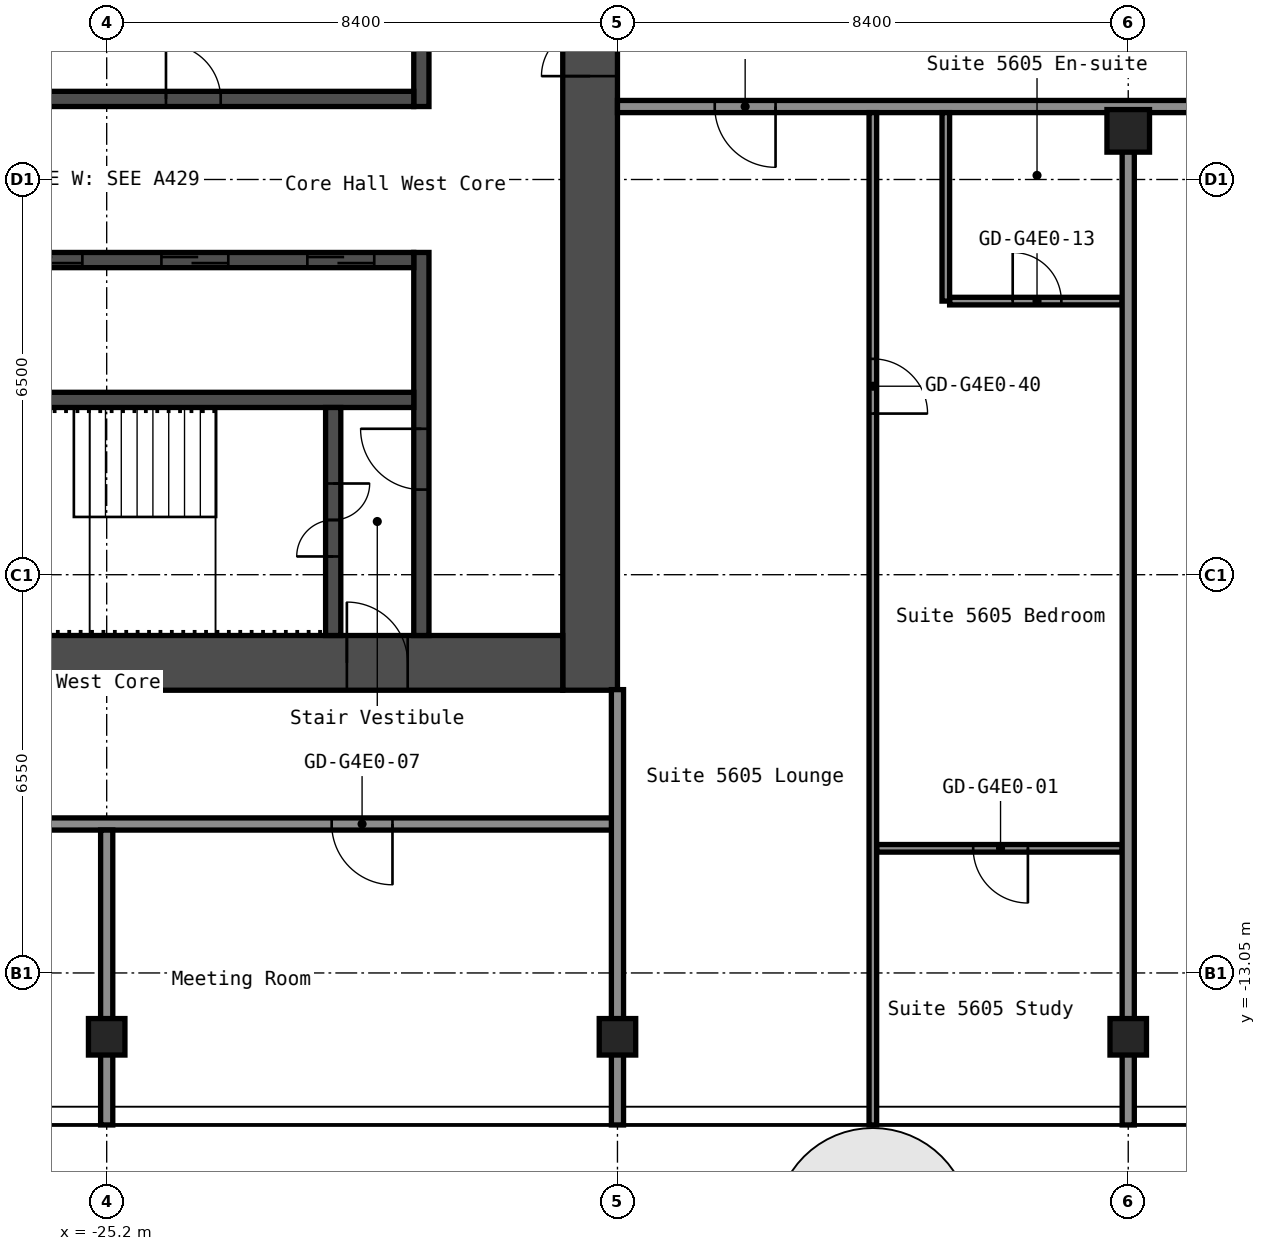
"""IFC4 building model, lengths in metres.
Left out: names, types, materials, properties, quantities, classifications, styles, units other than length and angle.
Written with IfcOpenShell. Run it as: python <this file> out.ifc"""

import sys

from ifc_helpers import new_model, si_unit, direction, frame, frame_2d, origin, origin_2d, place, context, subcontext, project, spatial, rectangle, hollow_rectangle, extrude, element, fill, save


model = new_model("IFC4")
c1 = context("Model", 3, precision=1e-05, world=origin(), true_north=direction((0.0, 1.0)))
c2 = subcontext(c1, "Body", "Model", "MODEL_VIEW")
j1 = project(units=[si_unit("LENGTHUNIT", "METRE"), si_unit("PLANEANGLEUNIT", "RADIAN")], contexts=[c1])
p1 = place(None, origin())
s1 = spatial("IfcSite", under=j1, at=p1, CompositionType="ELEMENT")
p2 = place(p1, origin())
s2 = spatial("IfcBuilding", under=s1, at=p2, CompositionType="ELEMENT")
p3 = place(p2, frame((0.0, 0.0, 199.4)))
s3 = spatial("IfcBuildingStorey", under=s2, at=p3, CompositionType="ELEMENT", Elevation=199.4)
for number, where, z_axis, x_axis in (
    (1, (-25.2, -14.1, 0.0), (0.0, 0.0, 1.0), (1.0, 0.0, 0.0)),
    (2, (-16.8, -14.1, 0.0), (0.0, 0.0, 1.0), (1.0, 0.0, 0.0)),
    (3, (-8.4, -14.1, 0.0), (0.0, 0.0, 1.0), (1.0, 0.0, 0.0)),
):
    element("IfcColumn", number, at=place(p3, frame(where, z_axis=z_axis, x_axis=x_axis)), inside=s3, PredefinedType="COLUMN", context=c2, shape_type="SweptSolid", body=[
        extrude(hollow_rectangle(XDim=0.6, YDim=0.6, WallThickness=0.025, InnerFilletRadius=0.038, OuterFilletRadius=0.062, at=origin_2d()), origin(), (0.0, 0.0, 1.0), 2.75),
    ])
p4 = place(p3, frame((-8.4, 0.8, 0.0), z_axis=(0.0, 0.0, 1.0), x_axis=(1.0, 0.0, 0.0)))
e4 = element("IfcColumn", 4, at=p4, inside=s3, PredefinedType="COLUMN", context=c2, shape_type="SweptSolid", body=[
    extrude(hollow_rectangle(XDim=0.7, YDim=0.7, WallThickness=0.028, at=origin_2d()), origin(), (0.0, 0.0, 1.0), 2.75),
])
p5 = place(p3, frame((-17.25, -8.4, 0.0), z_axis=(0.0, 0.0, 1.0), x_axis=(0.0, 1.0, 0.0)))
e5 = element("IfcWall", 5, at=p5, inside=s3, PredefinedType="SHEAR", context=c2, shape_type="SweptSolid", body=[
    extrude(rectangle(XDim=16.8, YDim=0.9, at=frame_2d((8.4, 0.0))), origin(), (0.0, 0.0, 1.0), 2.75),
])
p6 = place(p5, frame((10.1, 0.0, 0.0)))
e6 = element("IfcOpeningElement", 6, at=p6, cuts=e5, PredefinedType="OPENING", context=c2, shape_type="SweptSolid", body=[
    extrude(rectangle(XDim=1.6, YDim=2.1, at=frame_2d((0.8, 1.05))), frame((0.0, 0.46, 0.0), z_axis=(0.0, -1.0, 0.0), x_axis=(1.0, 0.0, 0.0)), (0.0, 0.0, 1.0), 0.92),
])
p7 = place(p3, frame((-32.7, -7.95, 0.0), z_axis=(0.0, 0.0, 1.0), x_axis=(1.0, 0.0, 0.0)))
e7 = element("IfcWall", 7, at=p7, inside=s3, PredefinedType="SHEAR", context=c2, shape_type="SweptSolid", body=[
    extrude(rectangle(XDim=15.0, YDim=0.9, at=frame_2d((7.5, 0.0))), origin(), (0.0, 0.0, 1.0), 2.75),
])
p8 = place(p7, frame((11.45, 0.0, 0.0)))
e8 = element("IfcOpeningElement", 8, at=p8, cuts=e7, PredefinedType="OPENING", context=c2, shape_type="SweptSolid", body=[
    extrude(rectangle(XDim=1.0, YDim=2.1, at=frame_2d((0.5, 1.05))), frame((0.0, 0.46, 0.0), z_axis=(0.0, -1.0, 0.0), x_axis=(1.0, 0.0, 0.0)), (0.0, 0.0, 1.0), 0.92),
])
p9 = place(p3, frame((-20.025, 1.2, 0.0), z_axis=(0.0, 0.0, 1.0), x_axis=(0.0, 1.0, 0.0)))
e9 = element("IfcWall", 9, at=p9, inside=s3, PredefinedType="SHEAR", context=c2, shape_type="SweptSolid", body=[
    extrude(rectangle(XDim=6.3, YDim=0.25, at=frame_2d((3.15, 0.0))), origin(), (0.0, 0.0, 1.0), 2.75),
])
p10 = place(p3, frame((-20.025, -7.5, 0.0), z_axis=(0.0, 0.0, 1.0), x_axis=(0.0, 1.0, 0.0)))
e10 = element("IfcWall", 10, at=p10, inside=s3, PredefinedType="SHEAR", context=c2, shape_type="SweptSolid", body=[
    extrude(rectangle(XDim=6.3, YDim=0.25, at=frame_2d((3.15, 0.0))), origin(), (0.0, 0.0, 1.0), 2.75),
])
p11 = place(p10, frame((2.4, 0.0, 0.0)))
e11 = element("IfcOpeningElement", 11, at=p11, cuts=e10, PredefinedType="OPENING", context=c2, shape_type="SweptSolid", body=[
    extrude(rectangle(XDim=1.0, YDim=2.1, at=frame_2d((0.5, 1.05))), frame((0.0, 0.135, 0.0), z_axis=(0.0, -1.0, 0.0), x_axis=(1.0, 0.0, 0.0)), (0.0, 0.0, 1.0), 0.27),
])
p12 = place(p3, frame((-27.65, 1.325, 0.0), z_axis=(0.0, 0.0, 1.0), x_axis=(1.0, 0.0, 0.0)))
e12 = element("IfcWall", 12, at=p12, inside=s3, PredefinedType="SHEAR", context=c2, shape_type="SweptSolid", body=[
    extrude(rectangle(XDim=7.5, YDim=0.25, at=frame_2d((3.75, 0.0))), origin(), (0.0, 0.0, 1.0), 2.75),
])
p13 = place(p12, frame((3.425, 0.0, 0.0)))
e13 = element("IfcOpeningElement", 13, at=p13, cuts=e12, PredefinedType="OPENING", context=c2, shape_type="SweptSolid", body=[
    extrude(rectangle(XDim=0.9, YDim=2.1, at=frame_2d((0.45, 1.05))), frame((0.0, 0.135, 0.0), z_axis=(0.0, -1.0, 0.0), x_axis=(1.0, 0.0, 0.0)), (0.0, 0.0, 1.0), 0.27),
])
p14 = place(p3, frame((-27.65, -1.325, 0.0), z_axis=(0.0, 0.0, 1.0), x_axis=(1.0, 0.0, 0.0)))
e14 = element("IfcWall", 14, at=p14, inside=s3, PredefinedType="SHEAR", context=c2, shape_type="SweptSolid", body=[
    extrude(rectangle(XDim=7.5, YDim=0.25, at=frame_2d((3.75, 0.0))), origin(), (0.0, 0.0, 1.0), 2.75),
])
p15 = place(p14, frame((5.75, 0.0, 0.0)))
e15 = element("IfcOpeningElement", 15, at=p15, cuts=e14, PredefinedType="OPENING", context=c2, shape_type="SweptSolid", body=[
    extrude(rectangle(XDim=1.1, YDim=2.1, at=frame_2d((0.55, 1.05))), frame((0.0, 0.135, 0.0), z_axis=(0.0, -1.0, 0.0), x_axis=(1.0, 0.0, 0.0)), (0.0, 0.0, 1.0), 0.27),
])
p16 = place(p14, frame((3.35, 0.0, 0.0)))
e16 = element("IfcOpeningElement", 16, at=p16, cuts=e14, PredefinedType="OPENING", context=c2, shape_type="SweptSolid", body=[
    extrude(rectangle(XDim=1.1, YDim=2.1, at=frame_2d((0.55, 1.05))), frame((0.0, 0.135, 0.0), z_axis=(0.0, -1.0, 0.0), x_axis=(1.0, 0.0, 0.0)), (0.0, 0.0, 1.0), 0.27),
])
p17 = place(p14, frame((0.95, 0.0, 0.0)))
e17 = element("IfcOpeningElement", 17, at=p17, cuts=e14, PredefinedType="OPENING", context=c2, shape_type="SweptSolid", body=[
    extrude(rectangle(XDim=1.1, YDim=2.1, at=frame_2d((0.55, 1.05))), frame((0.0, 0.135, 0.0), z_axis=(0.0, -1.0, 0.0), x_axis=(1.0, 0.0, 0.0)), (0.0, 0.0, 1.0), 0.27),
])
p18 = place(p3, frame((-27.65, -3.625, 0.0), z_axis=(0.0, 0.0, 1.0), x_axis=(1.0, 0.0, 0.0)))
e18 = element("IfcWall", 18, at=p18, inside=s3, PredefinedType="SHEAR", context=c2, shape_type="SweptSolid", body=[
    extrude(rectangle(XDim=7.5, YDim=0.25, at=frame_2d((3.75, 0.0))), origin(), (0.0, 0.0, 1.0), 2.75),
])
p19 = place(p3, frame((-21.475, -7.5, 0.0), z_axis=(0.0, 0.0, 1.0), x_axis=(0.0, 1.0, 0.0)))
e19 = element("IfcWall", 19, at=p19, inside=s3, PredefinedType="SHEAR", context=c2, shape_type="SweptSolid", body=[
    extrude(rectangle(XDim=3.75, YDim=0.25, at=frame_2d((1.875, 0.0))), origin(), (0.0, 0.0, 1.0), 2.75),
])
p20 = place(p19, frame((1.3, 0.0, 0.0)))
e20 = element("IfcOpeningElement", 20, at=p20, cuts=e19, PredefinedType="OPENING", context=c2, shape_type="SweptSolid", body=[
    extrude(rectangle(XDim=1.2, YDim=2.1, at=frame_2d((0.6, 1.05))), frame((0.0, 0.135, 0.0), z_axis=(0.0, -1.0, 0.0), x_axis=(1.0, 0.0, 0.0)), (0.0, 0.0, 1.0), 0.27),
])
p21 = place(p3, frame((-12.538, -11.0, 0.0), z_axis=(0.0, 0.0, 1.0), x_axis=(1.0, 0.0, 0.0)))
e21 = element("IfcWall", 21, at=p21, inside=s3, PredefinedType="PARTITIONING", context=c2, shape_type="SweptSolid", body=[
    extrude(rectangle(XDim=4.038, YDim=0.125, at=frame_2d((2.019, 0.0))), origin(), (0.0, 0.0, 1.0), 2.75),
])
p22 = place(p21, frame((1.587, 0.0, 0.0)))
e22 = element("IfcOpeningElement", 22, at=p22, cuts=e21, PredefinedType="OPENING", context=c2, shape_type="SweptSolid", body=[
    extrude(rectangle(XDim=0.9, YDim=2.1, at=frame_2d((0.45, 1.05))), frame((0.0, 0.073, 0.0), z_axis=(0.0, -1.0, 0.0), x_axis=(1.0, 0.0, 0.0)), (0.0, 0.0, 1.0), 0.145),
])
p23 = place(p3, frame((-38.1, -10.6, 0.0), z_axis=(0.0, 0.0, 1.0), x_axis=(1.0, 0.0, 0.0)))
e23 = element("IfcWall", 23, at=p23, inside=s3, PredefinedType="PARTITIONING", context=c2, shape_type="SweptSolid", body=[
    extrude(rectangle(XDim=21.3, YDim=0.2, at=frame_2d((10.65, 0.0))), origin(), (0.0, 0.0, 1.0), 2.75),
])
p24 = place(p23, frame((1.95, 0.0, 0.0)))
e24 = element("IfcOpeningElement", 24, at=p24, cuts=e23, PredefinedType="OPENING", context=c2, shape_type="SweptSolid", body=[
    extrude(rectangle(XDim=0.9, YDim=2.1, at=frame_2d((0.45, 1.05))), frame((0.0, 0.11, 0.0), z_axis=(0.0, -1.0, 0.0), x_axis=(1.0, 0.0, 0.0)), (0.0, 0.0, 1.0), 0.22),
])
p25 = place(p23, frame((6.32, 0.0, 0.0)))
e25 = element("IfcOpeningElement", 25, at=p25, cuts=e23, PredefinedType="OPENING", context=c2, shape_type="SweptSolid", body=[
    extrude(rectangle(XDim=0.9, YDim=2.1, at=frame_2d((0.45, 1.05))), frame((0.0, 0.11, 0.0), z_axis=(0.0, -1.0, 0.0), x_axis=(1.0, 0.0, 0.0)), (0.0, 0.0, 1.0), 0.22),
])
p26 = place(p23, frame((10.52, 0.0, 0.0)))
e26 = element("IfcOpeningElement", 26, at=p26, cuts=e23, PredefinedType="OPENING", context=c2, shape_type="SweptSolid", body=[
    extrude(rectangle(XDim=0.9, YDim=2.1, at=frame_2d((0.45, 1.05))), frame((0.0, 0.11, 0.0), z_axis=(0.0, -1.0, 0.0), x_axis=(1.0, 0.0, 0.0)), (0.0, 0.0, 1.0), 0.22),
])
p27 = place(p23, frame((16.6, 0.0, 0.0)))
e27 = element("IfcOpeningElement", 27, at=p27, cuts=e23, PredefinedType="OPENING", context=c2, shape_type="SweptSolid", body=[
    extrude(rectangle(XDim=1.0, YDim=2.1, at=frame_2d((0.5, 1.05))), frame((0.0, 0.11, 0.0), z_axis=(0.0, -1.0, 0.0), x_axis=(1.0, 0.0, 0.0)), (0.0, 0.0, 1.0), 0.22),
])
p28 = place(p3, frame((-11.337, -2.0, 0.0), z_axis=(0.0, 0.0, 1.0), x_axis=(1.0, 0.0, 0.0)))
e28 = element("IfcWall", 28, at=p28, inside=s3, PredefinedType="PARTITIONING", context=c2, shape_type="SweptSolid", body=[
    extrude(rectangle(XDim=2.837, YDim=0.125, at=frame_2d((1.419, 0.0))), origin(), (0.0, 0.0, 1.0), 2.75),
])
p29 = place(p28, frame((1.038, 0.0, 0.0)))
e29 = element("IfcOpeningElement", 29, at=p29, cuts=e28, PredefinedType="OPENING", context=c2, shape_type="SweptSolid", body=[
    extrude(rectangle(XDim=0.8, YDim=2.1, at=frame_2d((0.4, 1.05))), frame((0.0, 0.073, 0.0), z_axis=(0.0, -1.0, 0.0), x_axis=(1.0, 0.0, 0.0)), (0.0, 0.0, 1.0), 0.145),
])
p30 = place(p3, frame((-16.8, 1.2, 0.0), z_axis=(0.0, 0.0, 1.0), x_axis=(1.0, 0.0, 0.0)))
e30 = element("IfcWall", 30, at=p30, inside=s3, PredefinedType="PARTITIONING", context=c2, shape_type="SweptSolid", body=[
    extrude(rectangle(XDim=33.6, YDim=0.2, at=frame_2d((16.8, 0.0))), origin(), (0.0, 0.0, 1.0), 2.75),
])
p31 = place(p30, frame((1.6, 0.0, 0.0)))
e31 = element("IfcOpeningElement", 31, at=p31, cuts=e30, PredefinedType="OPENING", context=c2, shape_type="SweptSolid", body=[
    extrude(rectangle(XDim=1.0, YDim=2.1, at=frame_2d((0.5, 1.05))), frame((0.0, 0.11, 0.0), z_axis=(0.0, -1.0, 0.0), x_axis=(1.0, 0.0, 0.0)), (0.0, 0.0, 1.0), 0.22),
])
p32 = place(p30, frame((10.3, 0.0, 0.0)))
e32 = element("IfcOpeningElement", 32, at=p32, cuts=e30, PredefinedType="OPENING", context=c2, shape_type="SweptSolid", body=[
    extrude(rectangle(XDim=1.0, YDim=2.1, at=frame_2d((0.5, 1.05))), frame((0.0, 0.11, 0.0), z_axis=(0.0, -1.0, 0.0), x_axis=(1.0, 0.0, 0.0)), (0.0, 0.0, 1.0), 0.22),
])
p33 = place(p30, frame((22.6, 0.0, 0.0)))
e33 = element("IfcOpeningElement", 33, at=p33, cuts=e30, PredefinedType="OPENING", context=c2, shape_type="SweptSolid", body=[
    extrude(rectangle(XDim=1.0, YDim=2.1, at=frame_2d((0.5, 1.05))), frame((0.0, 0.11, 0.0), z_axis=(0.0, -1.0, 0.0), x_axis=(1.0, 0.0, 0.0)), (0.0, 0.0, 1.0), 0.22),
])
p34 = place(p30, frame((31.0, 0.0, 0.0)))
e34 = element("IfcOpeningElement", 34, at=p34, cuts=e30, PredefinedType="OPENING", context=c2, shape_type="SweptSolid", body=[
    extrude(rectangle(XDim=1.0, YDim=2.1, at=frame_2d((0.5, 1.05))), frame((0.0, 0.11, 0.0), z_axis=(0.0, -1.0, 0.0), x_axis=(1.0, 0.0, 0.0)), (0.0, 0.0, 1.0), 0.22),
])
p35 = place(p3, frame((-25.2, -15.55, 0.0), z_axis=(0.0, 0.0, 1.0), x_axis=(0.0, 1.0, 0.0)))
e35 = element("IfcWall", 35, at=p35, inside=s3, PredefinedType="PARTITIONING", context=c2, shape_type="SweptSolid", body=[
    extrude(rectangle(XDim=4.85, YDim=0.2, at=frame_2d((2.425, 0.0))), origin(), (0.0, 0.0, 1.0), 2.75),
])
p36 = place(p3, frame((-16.8, -15.55, 0.0), z_axis=(0.0, 0.0, 1.0), x_axis=(0.0, 1.0, 0.0)))
e36 = element("IfcWall", 36, at=p36, inside=s3, PredefinedType="PARTITIONING", context=c2, shape_type="SweptSolid", body=[
    extrude(rectangle(XDim=7.16, YDim=0.2, at=frame_2d((3.58, 0.0))), origin(), (0.0, 0.0, 1.0), 2.75),
])
p37 = place(p3, frame((-12.6, -15.55, 0.0), z_axis=(0.0, 0.0, 1.0), x_axis=(0.0, 1.0, 0.0)))
e37 = element("IfcWall", 37, at=p37, inside=s3, PredefinedType="PARTITIONING", context=c2, shape_type="SweptSolid", body=[
    extrude(rectangle(XDim=16.65, YDim=0.125, at=frame_2d((8.325, 0.0))), origin(), (0.0, 0.0, 1.0), 2.75),
])
p38 = place(p37, frame((11.7, 0.0, 0.0)))
e38 = element("IfcOpeningElement", 38, at=p38, cuts=e37, PredefinedType="OPENING", context=c2, shape_type="SweptSolid", body=[
    extrude(rectangle(XDim=0.9, YDim=2.1, at=frame_2d((0.45, 1.05))), frame((0.0, 0.073, 0.0), z_axis=(0.0, -1.0, 0.0), x_axis=(1.0, 0.0, 0.0)), (0.0, 0.0, 1.0), 0.145),
])
p39 = place(p3, frame((-11.4, -2.0, 0.0), z_axis=(0.0, 0.0, 1.0), x_axis=(0.0, 1.0, 0.0)))
e39 = element("IfcWall", 39, at=p39, inside=s3, PredefinedType="PARTITIONING", context=c2, shape_type="SweptSolid", body=[
    extrude(rectangle(XDim=3.1, YDim=0.125, at=frame_2d((1.55, 0.0))), origin(), (0.0, 0.0, 1.0), 2.75),
])
p40 = place(p3, frame((-8.4, -15.55, 0.0), z_axis=(0.0, 0.0, 1.0), x_axis=(0.0, 1.0, 0.0)))
e40 = element("IfcWall", 40, at=p40, inside=s3, PredefinedType="PARTITIONING", context=c2, shape_type="SweptSolid", body=[
    extrude(rectangle(XDim=16.01, YDim=0.2, at=frame_2d((8.005, 0.0))), origin(), (0.0, 0.0, 1.0), 2.75),
])
p41 = place(p6, origin())
e41 = element("IfcDoor", 41, at=p41, inside=s3, OperationType="DOUBLE_DOOR_SINGLE_SWING", PredefinedType="DOOR", context=c2, shape_type="SweptSolid", body=[
    extrude(rectangle(XDim=1.6, YDim=2.1, at=frame_2d((0.8, 1.05))), frame((0.0, 0.025, 0.0), z_axis=(0.0, -1.0, 0.0), x_axis=(1.0, 0.0, 0.0)), (0.0, 0.0, 1.0), 0.05),
])
fill(e6, e41)
p42 = place(p8, origin())
e42 = element("IfcDoor", 42, at=p42, inside=s3, OperationType="SINGLE_SWING_RIGHT", PredefinedType="DOOR", context=c2, shape_type="SweptSolid", body=[
    extrude(rectangle(XDim=1.0, YDim=2.1, at=frame_2d((0.5, 1.05))), frame((0.0, 0.025, 0.0), z_axis=(0.0, -1.0, 0.0), x_axis=(1.0, 0.0, 0.0)), (0.0, 0.0, 1.0), 0.05),
])
fill(e8, e42)
p43 = place(p20, origin())
e43 = element("IfcDoor", 43, at=p43, inside=s3, OperationType="DOUBLE_DOOR_SINGLE_SWING", PredefinedType="DOOR", context=c2, shape_type="SweptSolid", body=[
    extrude(rectangle(XDim=1.2, YDim=2.1, at=frame_2d((0.6, 1.05))), frame((0.0, 0.025, 0.0), z_axis=(0.0, -1.0, 0.0), x_axis=(1.0, 0.0, 0.0)), (0.0, 0.0, 1.0), 0.05),
])
fill(e20, e43)
p44 = place(p11, origin())
e44 = element("IfcDoor", 44, at=p44, inside=s3, OperationType="SINGLE_SWING_LEFT", PredefinedType="DOOR", context=c2, shape_type="SweptSolid", body=[
    extrude(rectangle(XDim=1.0, YDim=2.1, at=frame_2d((0.5, 1.05))), frame((0.0, 0.025, 0.0), z_axis=(0.0, -1.0, 0.0), x_axis=(1.0, 0.0, 0.0)), (0.0, 0.0, 1.0), 0.05),
])
fill(e11, e44)
p45 = place(p13, origin())
e45 = element("IfcDoor", 45, at=p45, inside=s3, OperationType="SINGLE_SWING_RIGHT", PredefinedType="DOOR", context=c2, shape_type="SweptSolid", body=[
    extrude(rectangle(XDim=0.9, YDim=2.1, at=frame_2d((0.45, 1.05))), frame((0.0, 0.025, 0.0), z_axis=(0.0, -1.0, 0.0), x_axis=(1.0, 0.0, 0.0)), (0.0, 0.0, 1.0), 0.05),
])
fill(e13, e45)
p46 = place(p15, origin())
e46 = element("IfcDoor", 46, at=p46, inside=s3, OperationType="DOUBLE_DOOR_SLIDING", PredefinedType="DOOR", context=c2, shape_type="SweptSolid", body=[
    extrude(rectangle(XDim=1.1, YDim=2.1, at=frame_2d((0.55, 1.05))), frame((0.0, 0.025, 0.0), z_axis=(0.0, -1.0, 0.0), x_axis=(1.0, 0.0, 0.0)), (0.0, 0.0, 1.0), 0.05),
])
fill(e15, e46)
p47 = place(p16, origin())
e47 = element("IfcDoor", 47, at=p47, inside=s3, OperationType="DOUBLE_DOOR_SLIDING", PredefinedType="DOOR", context=c2, shape_type="SweptSolid", body=[
    extrude(rectangle(XDim=1.1, YDim=2.1, at=frame_2d((0.55, 1.05))), frame((0.0, 0.025, 0.0), z_axis=(0.0, -1.0, 0.0), x_axis=(1.0, 0.0, 0.0)), (0.0, 0.0, 1.0), 0.05),
])
fill(e16, e47)
p48 = place(p17, origin())
e48 = element("IfcDoor", 48, at=p48, inside=s3, OperationType="DOUBLE_DOOR_SLIDING", PredefinedType="DOOR", context=c2, shape_type="SweptSolid", body=[
    extrude(rectangle(XDim=1.1, YDim=2.1, at=frame_2d((0.55, 1.05))), frame((0.0, 0.025, 0.0), z_axis=(0.0, -1.0, 0.0), x_axis=(1.0, 0.0, 0.0)), (0.0, 0.0, 1.0), 0.05),
])
fill(e17, e48)
p49 = place(p22, origin())
e49 = element("IfcDoor", 49, at=p49, inside=s3, OperationType="SINGLE_SWING_RIGHT", PredefinedType="DOOR", context=c2, shape_type="SweptSolid", body=[
    extrude(rectangle(XDim=0.9, YDim=2.1, at=frame_2d((0.45, 1.05))), frame((0.0, 0.025, 0.0), z_axis=(0.0, -1.0, 0.0), x_axis=(1.0, 0.0, 0.0)), (0.0, 0.0, 1.0), 0.05),
])
fill(e22, e49)
p50 = place(p27, origin())
e50 = element("IfcDoor", 50, at=p50, inside=s3, OperationType="SINGLE_SWING_RIGHT", PredefinedType="DOOR", context=c2, shape_type="SweptSolid", body=[
    extrude(rectangle(XDim=1.0, YDim=2.1, at=frame_2d((0.5, 1.05))), frame((0.0, 0.025, 0.0), z_axis=(0.0, -1.0, 0.0), x_axis=(1.0, 0.0, 0.0)), (0.0, 0.0, 1.0), 0.05),
])
fill(e27, e50)
p51 = place(p29, origin())
e51 = element("IfcDoor", 51, at=p51, inside=s3, OperationType="SINGLE_SWING_RIGHT", PredefinedType="DOOR", context=c2, shape_type="SweptSolid", body=[
    extrude(rectangle(XDim=0.8, YDim=2.1, at=frame_2d((0.4, 1.05))), frame((0.0, 0.025, 0.0), z_axis=(0.0, -1.0, 0.0), x_axis=(1.0, 0.0, 0.0)), (0.0, 0.0, 1.0), 0.05),
])
fill(e29, e51)
p52 = place(p31, origin())
e52 = element("IfcDoor", 52, at=p52, inside=s3, OperationType="SINGLE_SWING_RIGHT", PredefinedType="DOOR", context=c2, shape_type="SweptSolid", body=[
    extrude(rectangle(XDim=1.0, YDim=2.1, at=frame_2d((0.5, 1.05))), frame((0.0, 0.025, 0.0), z_axis=(0.0, -1.0, 0.0), x_axis=(1.0, 0.0, 0.0)), (0.0, 0.0, 1.0), 0.05),
])
fill(e31, e52)
p53 = place(p38, origin())
e53 = element("IfcDoor", 53, at=p53, inside=s3, OperationType="SINGLE_SWING_LEFT", PredefinedType="DOOR", context=c2, shape_type="SweptSolid", body=[
    extrude(rectangle(XDim=0.9, YDim=2.1, at=frame_2d((0.45, 1.05))), frame((0.0, 0.025, 0.0), z_axis=(0.0, -1.0, 0.0), x_axis=(1.0, 0.0, 0.0)), (0.0, 0.0, 1.0), 0.05),
])
fill(e38, e53)
save(model, sys.argv[1])
